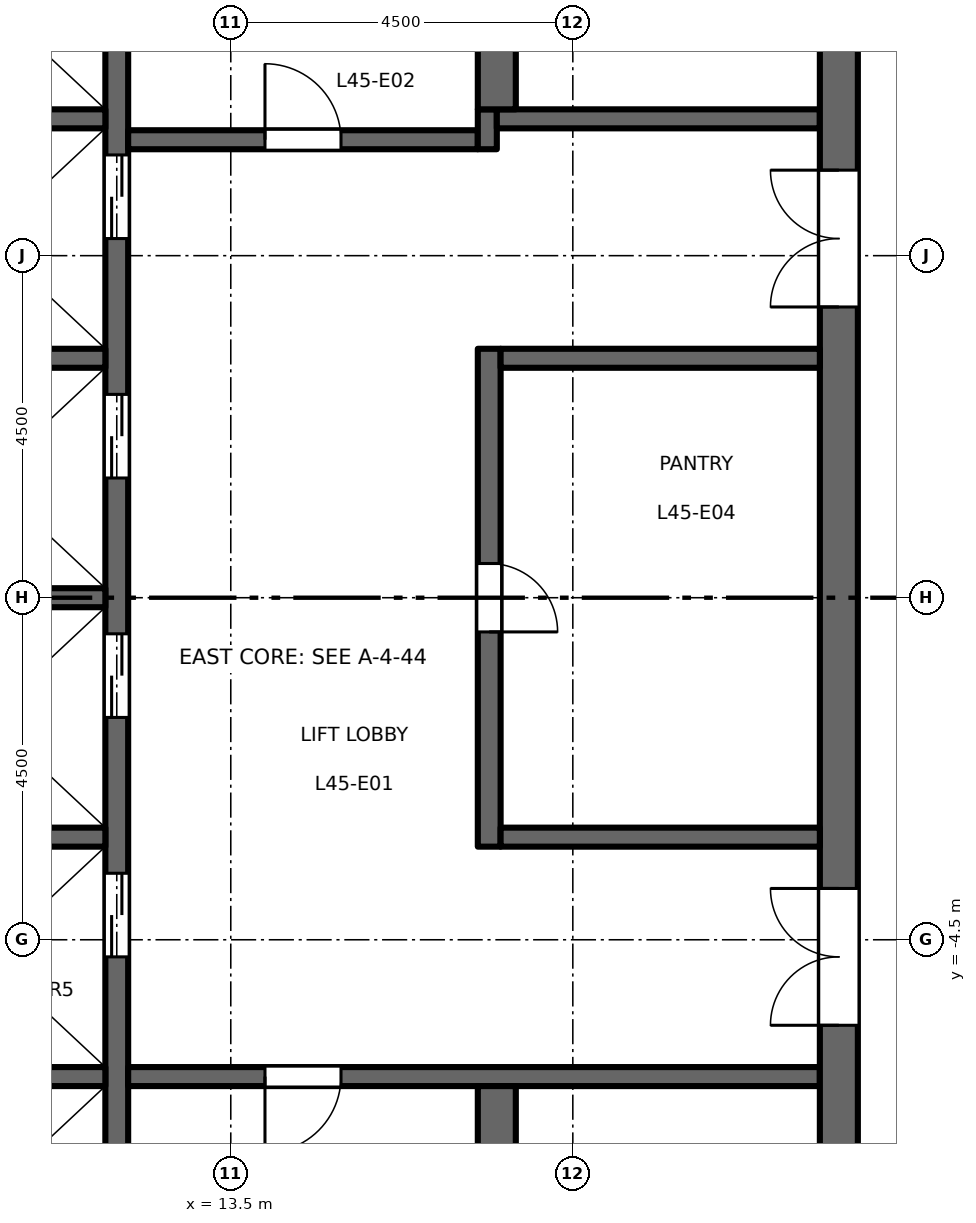
"""IFC4 building model, lengths in metres.
Left out: names, types, materials, properties, quantities, classifications, styles, units other than length and angle.
Written with IfcOpenShell. Run it as: python <this file> out.ifc"""

import sys

from ifc_helpers import new_model, si_unit, direction, frame, frame_2d, origin, place, context, subcontext, project, spatial, rectangle, extrude, element, fill, save


model = new_model("IFC4")
c1 = context("Model", 3, precision=1e-05, world=origin(), true_north=direction((0.0, 1.0)))
c2 = subcontext(c1, "Body", "Model", "MODEL_VIEW")
j1 = project(units=[si_unit("LENGTHUNIT", "METRE"), si_unit("PLANEANGLEUNIT", "RADIAN")], contexts=[c1])
p1 = place(None, origin())
s1 = spatial("IfcSite", under=j1, at=p1, CompositionType="ELEMENT")
p2 = place(p1, origin())
s2 = spatial("IfcBuilding", under=s1, at=p2, CompositionType="ELEMENT")
p3 = place(p2, frame((0.0, 0.0, 210.7)))
s3 = spatial("IfcBuildingStorey", under=s2, at=p3, CompositionType="ELEMENT", Elevation=210.7)
p4 = place(p3, frame((12.0, -9.45, 0.0), z_axis=(0.0, 0.0, 1.0), x_axis=(0.0, 1.0, 0.0)))
e1 = element("IfcWall", 1, at=p4, inside=s3, PredefinedType="SHEAR", context=c2, shape_type="SweptSolid", body=[
    extrude(rectangle(XDim=18.9, YDim=0.3, at=frame_2d((9.45, 0.0))), origin(), (0.0, 0.0, 1.0), 4.35),
])
p5 = place(p4, frame((4.725, 0.0, 0.0)))
e2 = element("IfcOpeningElement", 2, at=p5, cuts=e1, PredefinedType="OPENING", context=c2, shape_type="SweptSolid", body=[
    extrude(rectangle(XDim=1.1, YDim=2.1, at=frame_2d((0.55, 1.05))), frame((0.0, 0.16, 0.0), z_axis=(0.0, -1.0, 0.0), x_axis=(1.0, 0.0, 0.0)), (0.0, 0.0, 1.0), 0.32),
])
p6 = place(p4, frame((7.875, 0.0, 0.0)))
e3 = element("IfcOpeningElement", 3, at=p6, cuts=e1, PredefinedType="OPENING", context=c2, shape_type="SweptSolid", body=[
    extrude(rectangle(XDim=1.1, YDim=2.1, at=frame_2d((0.55, 1.05))), frame((0.0, 0.16, 0.0), z_axis=(0.0, -1.0, 0.0), x_axis=(1.0, 0.0, 0.0)), (0.0, 0.0, 1.0), 0.32),
])
p7 = place(p4, frame((11.025, 0.0, 0.0)))
e4 = element("IfcOpeningElement", 4, at=p7, cuts=e1, PredefinedType="OPENING", context=c2, shape_type="SweptSolid", body=[
    extrude(rectangle(XDim=1.1, YDim=2.1, at=frame_2d((0.55, 1.05))), frame((0.0, 0.16, 0.0), z_axis=(0.0, -1.0, 0.0), x_axis=(1.0, 0.0, 0.0)), (0.0, 0.0, 1.0), 0.32),
])
p8 = place(p4, frame((14.175, 0.0, 0.0)))
e5 = element("IfcOpeningElement", 5, at=p8, cuts=e1, PredefinedType="OPENING", context=c2, shape_type="SweptSolid", body=[
    extrude(rectangle(XDim=1.1, YDim=2.1, at=frame_2d((0.55, 1.05))), frame((0.0, 0.16, 0.0), z_axis=(0.0, -1.0, 0.0), x_axis=(1.0, 0.0, 0.0)), (0.0, 0.0, 1.0), 0.32),
])
p9 = place(p4, frame((16.725, 0.0, 0.0)))
e6 = element("IfcOpeningElement", 6, at=p9, cuts=e1, PredefinedType="OPENING", context=c2, shape_type="SweptSolid", body=[
    extrude(rectangle(XDim=1.2, YDim=2.1, at=frame_2d((0.6, 1.05))), frame((0.0, 0.16, 0.0), z_axis=(0.0, -1.0, 0.0), x_axis=(1.0, 0.0, 0.0)), (0.0, 0.0, 1.0), 0.32),
])
p10 = place(p4, frame((0.975, 0.0, 0.0)))
e7 = element("IfcOpeningElement", 7, at=p10, cuts=e1, PredefinedType="OPENING", context=c2, shape_type="SweptSolid", body=[
    extrude(rectangle(XDim=1.2, YDim=2.1, at=frame_2d((0.6, 1.05))), frame((0.0, 0.16, 0.0), z_axis=(0.0, -1.0, 0.0), x_axis=(1.0, 0.0, 0.0)), (0.0, 0.0, 1.0), 0.32),
])
p11 = place(p3, frame((12.15, 6.025, 0.0), z_axis=(0.0, 0.0, 1.0), x_axis=(1.0, 0.0, 0.0)))
e8 = element("IfcWall", 8, at=p11, inside=s3, PredefinedType="SHEAR", context=c2, shape_type="SweptSolid", body=[
    extrude(rectangle(XDim=4.6, YDim=0.25, at=frame_2d((2.3, 0.0))), origin(), (0.0, 0.0, 1.0), 4.35),
])
p12 = place(p11, frame((1.8, 0.0, 0.0)))
e9 = element("IfcOpeningElement", 9, at=p12, cuts=e8, PredefinedType="OPENING", context=c2, shape_type="SweptSolid", body=[
    extrude(rectangle(XDim=1.0, YDim=2.1, at=frame_2d((0.5, 1.05))), frame((0.0, 0.135, 0.0), z_axis=(0.0, -1.0, 0.0), x_axis=(1.0, 0.0, 0.0)), (0.0, 0.0, 1.0), 0.27),
])
p13 = place(p3, frame((16.875, 5.9, 0.0), z_axis=(0.0, 0.0, 1.0), x_axis=(0.0, 1.0, 0.0)))
e10 = element("IfcWall", 10, at=p13, inside=s3, PredefinedType="SHEAR", context=c2, shape_type="SweptSolid", body=[
    extrude(rectangle(XDim=0.525, YDim=0.25, at=frame_2d((0.263, 0.0))), origin(), (0.0, 0.0, 1.0), 4.35),
])
p14 = place(p3, frame((17.0, 6.3, 0.0), z_axis=(0.0, 0.0, 1.0), x_axis=(1.0, 0.0, 0.0)))
e11 = element("IfcWall", 11, at=p14, inside=s3, PredefinedType="SHEAR", context=c2, shape_type="SweptSolid", body=[
    extrude(rectangle(XDim=4.25, YDim=0.25, at=frame_2d((2.125, 0.0))), origin(), (0.0, 0.0, 1.0), 4.35),
])
p15 = place(p3, frame((12.15, -6.3, 0.0), z_axis=(0.0, 0.0, 1.0), x_axis=(1.0, 0.0, 0.0)))
e12 = element("IfcWall", 12, at=p15, inside=s3, PredefinedType="SHEAR", context=c2, shape_type="SweptSolid", body=[
    extrude(rectangle(XDim=9.1, YDim=0.25, at=frame_2d((4.55, 0.0))), origin(), (0.0, 0.0, 1.0), 4.35),
])
p16 = place(p15, frame((1.8, 0.0, 0.0)))
e13 = element("IfcOpeningElement", 13, at=p16, cuts=e12, PredefinedType="OPENING", context=c2, shape_type="SweptSolid", body=[
    extrude(rectangle(XDim=1.0, YDim=2.1, at=frame_2d((0.5, 1.05))), frame((0.0, 0.135, 0.0), z_axis=(0.0, -1.0, 0.0), x_axis=(1.0, 0.0, 0.0)), (0.0, 0.0, 1.0), 0.27),
])
p17 = place(p3, frame((21.5, -13.0, 0.0), z_axis=(0.0, 0.0, 1.0), x_axis=(0.0, 1.0, 0.0)))
e14 = element("IfcWall", 14, at=p17, inside=s3, PredefinedType="SHEAR", context=c2, shape_type="SweptSolid", body=[
    extrude(rectangle(XDim=26.0, YDim=0.5, at=frame_2d((13.0, 0.0))), origin(), (0.0, 0.0, 1.0), 4.35),
])
p18 = place(p17, frame((16.825, 0.0, 0.0)))
e15 = element("IfcOpeningElement", 15, at=p18, cuts=e14, PredefinedType="OPENING", context=c2, shape_type="SweptSolid", body=[
    extrude(rectangle(XDim=1.8, YDim=2.1, at=frame_2d((0.9, 1.05))), frame((0.0, 0.26, 0.0), z_axis=(0.0, -1.0, 0.0), x_axis=(1.0, 0.0, 0.0)), (0.0, 0.0, 1.0), 0.52),
])
p19 = place(p17, frame((7.375, 0.0, 0.0)))
e16 = element("IfcOpeningElement", 16, at=p19, cuts=e14, PredefinedType="OPENING", context=c2, shape_type="SweptSolid", body=[
    extrude(rectangle(XDim=1.8, YDim=2.1, at=frame_2d((0.9, 1.05))), frame((0.0, 0.26, 0.0), z_axis=(0.0, -1.0, 0.0), x_axis=(1.0, 0.0, 0.0)), (0.0, 0.0, 1.0), 0.52),
])
p20 = place(p3, frame((16.9, -3.275, 0.0), z_axis=(0.0, 0.0, 1.0), x_axis=(0.0, 1.0, 0.0)))
e17 = element("IfcWall", 17, at=p20, inside=s3, PredefinedType="SHEAR", context=c2, shape_type="SweptSolid", body=[
    extrude(rectangle(XDim=6.55, YDim=0.3, at=frame_2d((3.275, 0.0))), origin(), (0.0, 0.0, 1.0), 4.35),
])
p21 = place(p20, frame((2.825, 0.0, 0.0)))
e18 = element("IfcOpeningElement", 18, at=p21, cuts=e17, PredefinedType="OPENING", context=c2, shape_type="SweptSolid", body=[
    extrude(rectangle(XDim=0.9, YDim=2.1, at=frame_2d((0.45, 1.05))), frame((0.0, 0.16, 0.0), z_axis=(0.0, -1.0, 0.0), x_axis=(1.0, 0.0, 0.0)), (0.0, 0.0, 1.0), 0.32),
])
for number, where, z_axis, x_axis in (
    (19, (17.05, 3.15, 0.0), (0.0, 0.0, 1.0), (1.0, 0.0, 0.0)),
    (20, (17.05, -3.15, 0.0), (0.0, 0.0, 1.0), (1.0, 0.0, 0.0)),
):
    element("IfcWall", number, at=place(p3, frame(where, z_axis=z_axis, x_axis=x_axis)), inside=s3, PredefinedType="SHEAR", context=c2, shape_type="SweptSolid", body=[
        extrude(rectangle(XDim=4.2, YDim=0.25, at=frame_2d((2.1, 0.0))), origin(), (0.0, 0.0, 1.0), 4.35),
    ])
for number, where, z_axis, x_axis in (
    (21, (17.0, 6.425, 0.0), (0.0, 0.0, 1.0), (0.0, 1.0, 0.0)),
    (22, (17.0, -13.0, 0.0), (0.0, 0.0, 1.0), (0.0, 1.0, 0.0)),
):
    element("IfcWall", number, at=place(p3, frame(where, z_axis=z_axis, x_axis=x_axis)), inside=s3, PredefinedType="SHEAR", context=c2, shape_type="SweptSolid", body=[
        extrude(rectangle(XDim=6.575, YDim=0.5, at=frame_2d((3.288, 0.0))), origin(), (0.0, 0.0, 1.0), 4.35),
    ])
for number, where, z_axis, x_axis in (
    (23, (8.75, 0.0, 0.0), (0.0, 0.0, 1.0), (1.0, 0.0, 0.0)),
    (24, (8.75, 3.15, 0.0), (0.0, 0.0, 1.0), (1.0, 0.0, 0.0)),
    (25, (8.75, 6.3, 0.0), (0.0, 0.0, 1.0), (1.0, 0.0, 0.0)),
    (26, (8.75, -3.15, 0.0), (0.0, 0.0, 1.0), (1.0, 0.0, 0.0)),
    (27, (8.75, -6.3, 0.0), (0.0, 0.0, 1.0), (1.0, 0.0, 0.0)),
):
    element("IfcWall", number, at=place(p3, frame(where, z_axis=z_axis, x_axis=x_axis)), inside=s3, PredefinedType="SHEAR", context=c2, shape_type="SweptSolid", body=[
        extrude(rectangle(XDim=3.1, YDim=0.25, at=frame_2d((1.55, 0.0))), origin(), (0.0, 0.0, 1.0), 4.35),
    ])
p22 = place(p12, origin())
e28 = element("IfcDoor", 28, at=p22, inside=s3, OperationType="SINGLE_SWING_RIGHT", PredefinedType="DOOR", context=c2, shape_type="SweptSolid", body=[
    extrude(rectangle(XDim=1.0, YDim=2.1, at=frame_2d((0.5, 1.05))), frame((0.0, 0.025, 0.0), z_axis=(0.0, -1.0, 0.0), x_axis=(1.0, 0.0, 0.0)), (0.0, 0.0, 1.0), 0.05),
])
fill(e9, e28)
p23 = place(p16, origin())
e29 = element("IfcDoor", 29, at=p23, inside=s3, OperationType="SINGLE_SWING_LEFT", PredefinedType="DOOR", context=c2, shape_type="SweptSolid", body=[
    extrude(rectangle(XDim=1.0, YDim=2.1, at=frame_2d((0.5, 1.05))), frame((0.0, 0.025, 0.0), z_axis=(0.0, -1.0, 0.0), x_axis=(1.0, 0.0, 0.0)), (0.0, 0.0, 1.0), 0.05),
])
fill(e13, e29)
p24 = place(p18, origin())
e30 = element("IfcDoor", 30, at=p24, inside=s3, OperationType="DOUBLE_DOOR_DOUBLE_SWING", PredefinedType="DOOR", context=c2, shape_type="SweptSolid", body=[
    extrude(rectangle(XDim=1.8, YDim=2.1, at=frame_2d((0.9, 1.05))), frame((0.0, 0.025, 0.0), z_axis=(0.0, -1.0, 0.0), x_axis=(1.0, 0.0, 0.0)), (0.0, 0.0, 1.0), 0.05),
])
fill(e15, e30)
p25 = place(p19, origin())
e31 = element("IfcDoor", 31, at=p25, inside=s3, OperationType="DOUBLE_DOOR_DOUBLE_SWING", PredefinedType="DOOR", context=c2, shape_type="SweptSolid", body=[
    extrude(rectangle(XDim=1.8, YDim=2.1, at=frame_2d((0.9, 1.05))), frame((0.0, 0.025, 0.0), z_axis=(0.0, -1.0, 0.0), x_axis=(1.0, 0.0, 0.0)), (0.0, 0.0, 1.0), 0.05),
])
fill(e16, e31)
p26 = place(p5, origin())
e32 = element("IfcDoor", 32, at=p26, inside=s3, OperationType="DOUBLE_DOOR_SLIDING", PredefinedType="DOOR", context=c2, shape_type="SweptSolid", body=[
    extrude(rectangle(XDim=1.1, YDim=2.1, at=frame_2d((0.55, 1.05))), frame((0.0, 0.025, 0.0), z_axis=(0.0, -1.0, 0.0), x_axis=(1.0, 0.0, 0.0)), (0.0, 0.0, 1.0), 0.05),
])
fill(e2, e32)
p27 = place(p6, origin())
e33 = element("IfcDoor", 33, at=p27, inside=s3, OperationType="DOUBLE_DOOR_SLIDING", PredefinedType="DOOR", context=c2, shape_type="SweptSolid", body=[
    extrude(rectangle(XDim=1.1, YDim=2.1, at=frame_2d((0.55, 1.05))), frame((0.0, 0.025, 0.0), z_axis=(0.0, -1.0, 0.0), x_axis=(1.0, 0.0, 0.0)), (0.0, 0.0, 1.0), 0.05),
])
fill(e3, e33)
p28 = place(p7, origin())
e34 = element("IfcDoor", 34, at=p28, inside=s3, OperationType="DOUBLE_DOOR_SLIDING", PredefinedType="DOOR", context=c2, shape_type="SweptSolid", body=[
    extrude(rectangle(XDim=1.1, YDim=2.1, at=frame_2d((0.55, 1.05))), frame((0.0, 0.025, 0.0), z_axis=(0.0, -1.0, 0.0), x_axis=(1.0, 0.0, 0.0)), (0.0, 0.0, 1.0), 0.05),
])
fill(e4, e34)
p29 = place(p8, origin())
e35 = element("IfcDoor", 35, at=p29, inside=s3, OperationType="DOUBLE_DOOR_SLIDING", PredefinedType="DOOR", context=c2, shape_type="SweptSolid", body=[
    extrude(rectangle(XDim=1.1, YDim=2.1, at=frame_2d((0.55, 1.05))), frame((0.0, 0.025, 0.0), z_axis=(0.0, -1.0, 0.0), x_axis=(1.0, 0.0, 0.0)), (0.0, 0.0, 1.0), 0.05),
])
fill(e5, e35)
p30 = place(p21, origin())
e36 = element("IfcDoor", 36, at=p30, inside=s3, OperationType="SINGLE_SWING_LEFT", PredefinedType="DOOR", context=c2, shape_type="SweptSolid", body=[
    extrude(rectangle(XDim=0.9, YDim=2.1, at=frame_2d((0.45, 1.05))), frame((0.0, 0.025, 0.0), z_axis=(0.0, -1.0, 0.0), x_axis=(1.0, 0.0, 0.0)), (0.0, 0.0, 1.0), 0.05),
])
fill(e18, e36)
save(model, sys.argv[1])
